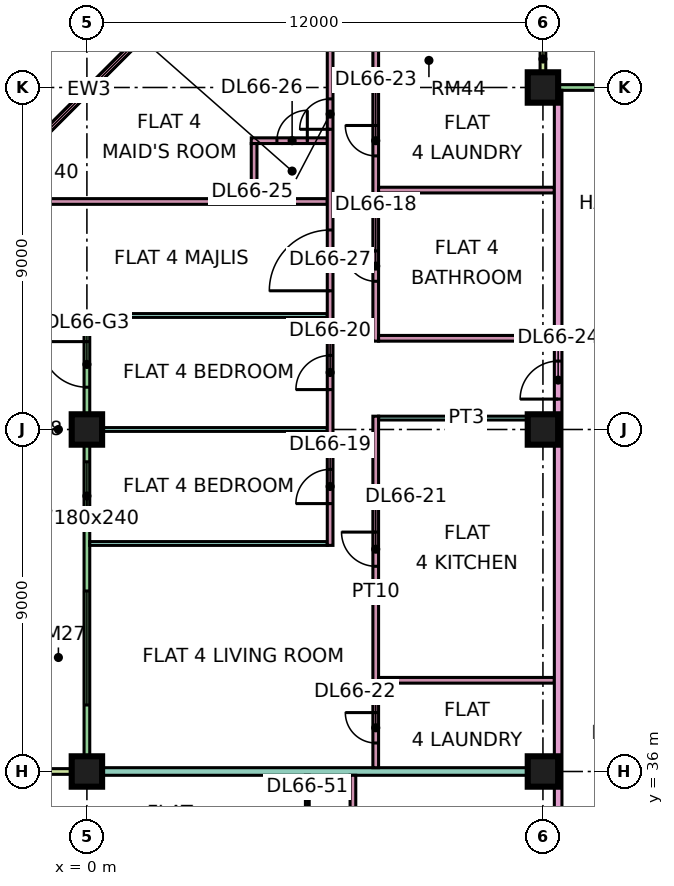
"""IFC4 building model, lengths in metres.
Left out: names, types, materials, properties, quantities, classifications, styles, units other than length and angle.
Written with IfcOpenShell. Run it as: python <this file> out.ifc"""

import sys

from ifc_helpers import new_model, si_unit, direction, frame, frame_2d, origin, origin_2d, place, context, subcontext, project, spatial, rectangle, extrude, element, fill, save


model = new_model("IFC4")
c1 = context("Model", 3, precision=1e-05, world=origin(), true_north=direction((0.0, 1.0)))
c2 = subcontext(c1, "Body", "Model", "MODEL_VIEW")
j1 = project(units=[si_unit("LENGTHUNIT", "METRE"), si_unit("PLANEANGLEUNIT", "RADIAN")], contexts=[c1])
p1 = place(None, origin())
s1 = spatial("IfcSite", under=j1, at=p1, CompositionType="ELEMENT")
p2 = place(p1, origin())
s2 = spatial("IfcBuilding", under=s1, at=p2, CompositionType="ELEMENT")
p3 = place(p2, frame((0.0, 0.0, 284.65)))
s3 = spatial("IfcBuildingStorey", under=s2, at=p3, CompositionType="ELEMENT", Elevation=284.65)
p4 = place(p3, frame((0.0, 36.0, 0.0), z_axis=(0.0, 0.0, 1.0), x_axis=(1.0, 0.0, 0.0)))
e1 = element("IfcColumn", 1, at=p4, inside=s3, PredefinedType="COLUMN", context=c2, shape_type="SweptSolid", body=[
    extrude(rectangle(XDim=0.8, YDim=0.8, at=origin_2d()), origin(), (0.0, 0.0, 1.0), 3.75),
])
for number, where, z_axis, x_axis in (
    (2, (0.0, 45.0, 0.0), (0.0, 0.0, 1.0), (1.0, 0.0, 0.0)),
    (3, (12.0, 36.0, 0.0), (0.0, 0.0, 1.0), (1.0, 0.0, 0.0)),
    (4, (12.0, 45.0, 0.0), (0.0, 0.0, 1.0), (1.0, 0.0, 0.0)),
    (5, (12.0, 54.0, 0.0), (0.0, 0.0, 1.0), (1.0, 0.0, 0.0)),
):
    element("IfcColumn", number, at=place(p3, frame(where, z_axis=z_axis, x_axis=x_axis)), inside=s3, PredefinedType="COLUMN", context=c2, shape_type="SweptSolid", body=[
        extrude(rectangle(XDim=0.8, YDim=0.8, at=origin_2d()), origin(), (0.0, 0.0, 1.0), 3.75),
    ])
p5 = place(p3, frame((22.425, 54.0, 0.0), z_axis=(0.0, 0.0, 1.0), x_axis=(-1.0, 0.0, 0.0)))
e6 = element("IfcWall", 6, at=p5, inside=s3, PredefinedType="SOLIDWALL", context=c2, shape_type="SweptSolid", body=[
    extrude(rectangle(XDim=10.35, YDim=0.15, at=frame_2d((5.175, 0.0))), origin(), (0.0, 0.0, 1.0), 3.35),
])
p6 = place(p5, frame((1.012, 0.0, 0.45)))
e7 = element("IfcOpeningElement", 7, at=p6, cuts=e6, PredefinedType="OPENING", context=c2, shape_type="SweptSolid", body=[
    extrude(rectangle(XDim=4.8, YDim=2.4, at=frame_2d((2.4, 1.2))), frame((0.0, 0.085, 0.0), z_axis=(0.0, -1.0, 0.0), x_axis=(1.0, 0.0, 0.0)), (0.0, 0.0, 1.0), 0.17),
])
p7 = place(p3, frame((12.0, 55.5, 0.0), z_axis=(0.0, 0.0, 1.0), x_axis=(0.0, -1.0, 0.0)))
e8 = element("IfcWall", 8, at=p7, inside=s3, PredefinedType="SOLIDWALL", context=c2, shape_type="SweptSolid", body=[
    extrude(rectangle(XDim=1.5, YDim=0.15, at=frame_2d((0.75, 0.0))), origin(), (0.0, 0.0, 1.0), 3.35),
])
p8 = place(p3, frame((1.553, 55.447, 0.0), z_axis=(0.0, 0.0, 1.0), x_axis=(-0.707106781187, -0.707106781187, 0.0)))
e9 = element("IfcWall", 9, at=p8, inside=s3, PredefinedType="SOLIDWALL", context=c2, shape_type="SweptSolid", body=[
    extrude(rectangle(XDim=4.243, YDim=0.15, at=frame_2d((2.121, 0.0))), origin(), (0.0, 0.0, 1.0), 3.35),
])
p9 = place(p8, frame((0.621, 0.0, 0.45)))
e10 = element("IfcOpeningElement", 10, at=p9, cuts=e9, PredefinedType="OPENING", context=c2, shape_type="SweptSolid", body=[
    extrude(rectangle(XDim=3.0, YDim=2.4, at=frame_2d((1.5, 1.2))), frame((0.0, 0.085, 0.0), z_axis=(0.0, -1.0, 0.0), x_axis=(1.0, 0.0, 0.0)), (0.0, 0.0, 1.0), 0.17),
])
p10 = place(p3, frame((0.0, 47.925, 0.0), z_axis=(0.0, 0.0, 1.0), x_axis=(0.0, -1.0, 0.0)))
e11 = element("IfcWall", 11, at=p10, inside=s3, PredefinedType="SOLIDWALL", context=c2, shape_type="SweptSolid", body=[
    extrude(rectangle(XDim=11.85, YDim=0.15, at=frame_2d((5.925, 0.0))), origin(), (0.0, 0.0, 1.0), 3.35),
])
p11 = place(p10, frame((0.613, 0.0, 0.0)))
e12 = element("IfcOpeningElement", 12, at=p11, cuts=e11, PredefinedType="OPENING", context=c2, shape_type="SweptSolid", body=[
    extrude(rectangle(XDim=1.2, YDim=2.4, at=frame_2d((0.6, 1.2))), frame((0.0, 0.085, 0.0), z_axis=(0.0, -1.0, 0.0), x_axis=(1.0, 0.0, 0.0)), (0.0, 0.0, 1.0), 0.17),
])
p12 = place(p10, frame((3.775, 0.0, 0.45)))
e13 = element("IfcOpeningElement", 13, at=p12, cuts=e11, PredefinedType="OPENING", context=c2, shape_type="SweptSolid", body=[
    extrude(rectangle(XDim=1.8, YDim=2.4, at=frame_2d((0.9, 1.2))), frame((0.0, 0.085, 0.0), z_axis=(0.0, -1.0, 0.0), x_axis=(1.0, 0.0, 0.0)), (0.0, 0.0, 1.0), 0.17),
])
p13 = place(p10, frame((7.175, 0.0, 0.45)))
e14 = element("IfcOpeningElement", 14, at=p13, cuts=e11, PredefinedType="OPENING", context=c2, shape_type="SweptSolid", body=[
    extrude(rectangle(XDim=3.0, YDim=2.4, at=frame_2d((1.5, 1.2))), frame((0.0, 0.085, 0.0), z_axis=(0.0, -1.0, 0.0), x_axis=(1.0, 0.0, 0.0)), (0.0, 0.0, 1.0), 0.17),
])
for number, where, z_axis, x_axis in (
    (15, (-1.5, 48.0, 0.0), (0.0, 0.0, 1.0), (1.0, 0.0, 0.0)),
    (16, (-1.5, 36.0, 0.0), (0.0, 0.0, 1.0), (1.0, 0.0, 0.0)),
):
    element("IfcWall", number, at=place(p3, frame(where, z_axis=z_axis, x_axis=x_axis)), inside=s3, PredefinedType="SOLIDWALL", context=c2, shape_type="SweptSolid", body=[
        extrude(rectangle(XDim=1.5, YDim=0.15, at=frame_2d((0.75, 0.0))), origin(), (0.0, 0.0, 1.0), 3.35),
    ])
p14 = place(p3, frame((-1.351, 51.0, 0.0), z_axis=(0.0, 0.0, 1.0), x_axis=(1.0, 0.0, 0.0)))
e17 = element("IfcWall", 17, at=p14, inside=s3, PredefinedType="PARTITIONING", context=c2, shape_type="SweptSolid", body=[
    extrude(rectangle(XDim=7.676, YDim=0.15, at=frame_2d((3.838, 0.0))), origin(), (0.0, 0.0, 1.0), 3.35),
])
e18 = element("IfcWall", 18, at=p4, inside=s3, PredefinedType="PARTITIONING", context=c2, shape_type="SweptSolid", body=[
    extrude(rectangle(XDim=12.3, YDim=0.2, at=frame_2d((6.15, 0.0))), origin(), (0.0, 0.0, 1.0), 3.35),
])
p15 = place(p3, frame((0.0, 48.0, 0.0), z_axis=(0.0, 0.0, 1.0), x_axis=(1.0, 0.0, 0.0)))
e19 = element("IfcWall", 19, at=p15, inside=s3, PredefinedType="PARTITIONING", context=c2, shape_type="SweptSolid", body=[
    extrude(rectangle(XDim=6.325, YDim=0.1, at=frame_2d((3.163, 0.0))), origin(), (0.0, 0.0, 1.0), 3.35),
])
for number, where, z_axis, x_axis in (
    (20, (0.074, 42.0, 0.0), (0.0, 0.0, 1.0), (1.0, 0.0, 0.0)),
    (21, (0.074, 45.0, 0.0), (0.0, 0.0, 1.0), (1.0, 0.0, 0.0)),
):
    element("IfcWall", number, at=place(p3, frame(where, z_axis=z_axis, x_axis=x_axis)), inside=s3, PredefinedType="PARTITIONING", context=c2, shape_type="SweptSolid", body=[
        extrude(rectangle(XDim=6.251, YDim=0.1, at=frame_2d((3.125, 0.0))), origin(), (0.0, 0.0, 1.0), 3.35),
    ])
p16 = place(p3, frame((4.325, 52.6, 0.0), z_axis=(0.0, 0.0, 1.0), x_axis=(1.0, 0.0, 0.0)))
e22 = element("IfcWall", 22, at=p16, inside=s3, PredefinedType="PARTITIONING", context=c2, shape_type="SweptSolid", body=[
    extrude(rectangle(XDim=2.0, YDim=0.15, at=frame_2d((1.0, 0.0))), origin(), (0.0, 0.0, 1.0), 3.35),
])
p17 = place(p16, frame((0.675, 0.0, 0.0)))
e23 = element("IfcOpeningElement", 23, at=p17, cuts=e22, PredefinedType="OPENING", context=c2, shape_type="SweptSolid", body=[
    extrude(rectangle(XDim=0.8, YDim=2.1, at=frame_2d((0.4, 1.05))), frame((0.0, 0.085, 0.0), z_axis=(0.0, -1.0, 0.0), x_axis=(1.0, 0.0, 0.0)), (0.0, 0.0, 1.0), 0.17),
])
p18 = place(p3, frame((4.4, 51.075, 0.0), z_axis=(0.0, 0.0, 1.0), x_axis=(0.0, 1.0, 0.0)))
e24 = element("IfcWall", 24, at=p18, inside=s3, PredefinedType="PARTITIONING", context=c2, shape_type="SweptSolid", body=[
    extrude(rectangle(XDim=1.45, YDim=0.15, at=frame_2d((0.725, 0.0))), origin(), (0.0, 0.0, 1.0), 3.35),
])
p19 = place(p3, frame((5.8, 29.95, 0.0), z_axis=(0.0, 0.0, 1.0), x_axis=(0.0, 1.0, 0.0)))
e25 = element("IfcWall", 25, at=p19, inside=s3, PredefinedType="PARTITIONING", context=c2, shape_type="SweptSolid", body=[
    extrude(rectangle(XDim=5.95, YDim=0.1, at=frame_2d((2.975, 0.0))), origin(), (0.0, 0.0, 1.0), 3.35),
])
p20 = place(p19, frame((1.1, 0.0, 0.0)))
e26 = element("IfcOpeningElement", 26, at=p20, cuts=e25, PredefinedType="OPENING", context=c2, shape_type="SweptSolid", body=[
    extrude(rectangle(XDim=0.9, YDim=2.1, at=frame_2d((0.45, 1.05))), frame((0.0, 0.06, 0.0), z_axis=(0.0, -1.0, 0.0), x_axis=(1.0, 0.0, 0.0)), (0.0, 0.0, 1.0), 0.12),
])
p21 = place(p19, frame((4.1, 0.0, 0.0)))
e27 = element("IfcOpeningElement", 27, at=p21, cuts=e25, PredefinedType="OPENING", context=c2, shape_type="SweptSolid", body=[
    extrude(rectangle(XDim=0.9, YDim=2.1, at=frame_2d((0.45, 1.05))), frame((0.0, 0.06, 0.0), z_axis=(0.0, -1.0, 0.0), x_axis=(1.0, 0.0, 0.0)), (0.0, 0.0, 1.0), 0.12),
])
p22 = place(p3, frame((6.4, 41.95, 0.0), z_axis=(0.0, 0.0, 1.0), x_axis=(0.0, 1.0, 0.0)))
e28 = element("IfcWall", 28, at=p22, inside=s3, PredefinedType="PARTITIONING", context=c2, shape_type="SweptSolid", body=[
    extrude(rectangle(XDim=13.4, YDim=0.15, at=frame_2d((6.7, 0.0))), origin(), (0.0, 0.0, 1.0), 3.35),
])
p23 = place(p22, frame((1.1, 0.0, 0.0)))
e29 = element("IfcOpeningElement", 29, at=p23, cuts=e28, PredefinedType="OPENING", context=c2, shape_type="SweptSolid", body=[
    extrude(rectangle(XDim=0.9, YDim=2.1, at=frame_2d((0.45, 1.05))), frame((0.0, 0.085, 0.0), z_axis=(0.0, -1.0, 0.0), x_axis=(1.0, 0.0, 0.0)), (0.0, 0.0, 1.0), 0.17),
])
p24 = place(p22, frame((4.1, 0.0, 0.0)))
e30 = element("IfcOpeningElement", 30, at=p24, cuts=e28, PredefinedType="OPENING", context=c2, shape_type="SweptSolid", body=[
    extrude(rectangle(XDim=0.9, YDim=2.1, at=frame_2d((0.45, 1.05))), frame((0.0, 0.085, 0.0), z_axis=(0.0, -1.0, 0.0), x_axis=(1.0, 0.0, 0.0)), (0.0, 0.0, 1.0), 0.17),
])
p25 = place(p22, frame((10.95, 0.0, 0.0)))
e31 = element("IfcOpeningElement", 31, at=p25, cuts=e28, PredefinedType="OPENING", context=c2, shape_type="SweptSolid", body=[
    extrude(rectangle(XDim=0.8, YDim=2.1, at=frame_2d((0.4, 1.05))), frame((0.0, 0.085, 0.0), z_axis=(0.0, -1.0, 0.0), x_axis=(1.0, 0.0, 0.0)), (0.0, 0.0, 1.0), 0.17),
])
p26 = place(p22, frame((6.7, 0.0, 0.0)))
e32 = element("IfcOpeningElement", 32, at=p26, cuts=e28, PredefinedType="OPENING", context=c2, shape_type="SweptSolid", body=[
    extrude(rectangle(XDim=1.6, YDim=2.1, at=frame_2d((0.8, 1.05))), frame((0.0, 0.085, 0.0), z_axis=(0.0, -1.0, 0.0), x_axis=(1.0, 0.0, 0.0)), (0.0, 0.0, 1.0), 0.17),
])
p27 = place(p3, frame((7.0, 27.525, 0.0), z_axis=(0.0, 0.0, 1.0), x_axis=(0.0, 1.0, 0.0)))
e33 = element("IfcWall", 33, at=p27, inside=s3, PredefinedType="PARTITIONING", context=c2, shape_type="SweptSolid", body=[
    extrude(rectangle(XDim=8.375, YDim=0.15, at=frame_2d((4.188, 0.0))), origin(), (0.0, 0.0, 1.0), 3.35),
])
p28 = place(p27, frame((0.525, 0.0, 0.0)))
e34 = element("IfcOpeningElement", 34, at=p28, cuts=e33, PredefinedType="OPENING", context=c2, shape_type="SweptSolid", body=[
    extrude(rectangle(XDim=0.8, YDim=2.1, at=frame_2d((0.4, 1.05))), frame((0.0, 0.085, 0.0), z_axis=(0.0, -1.0, 0.0), x_axis=(1.0, 0.0, 0.0)), (0.0, 0.0, 1.0), 0.17),
])
p29 = place(p27, frame((4.725, 0.0, 0.0)))
e35 = element("IfcOpeningElement", 35, at=p29, cuts=e33, PredefinedType="OPENING", context=c2, shape_type="SweptSolid", body=[
    extrude(rectangle(XDim=0.9, YDim=2.1, at=frame_2d((0.45, 1.05))), frame((0.0, 0.085, 0.0), z_axis=(0.0, -1.0, 0.0), x_axis=(1.0, 0.0, 0.0)), (0.0, 0.0, 1.0), 0.17),
])
p30 = place(p3, frame((7.6, 36.1, 0.0), z_axis=(0.0, 0.0, 1.0), x_axis=(0.0, 1.0, 0.0)))
e36 = element("IfcWall", 36, at=p30, inside=s3, PredefinedType="PARTITIONING", context=c2, shape_type="SweptSolid", body=[
    extrude(rectangle(XDim=9.25, YDim=0.15, at=frame_2d((4.625, 0.0))), origin(), (0.0, 0.0, 1.0), 3.35),
])
p31 = place(p30, frame((5.3, 0.0, 0.0)))
e37 = element("IfcOpeningElement", 37, at=p31, cuts=e36, PredefinedType="OPENING", context=c2, shape_type="SweptSolid", body=[
    extrude(rectangle(XDim=0.9, YDim=2.1, at=frame_2d((0.45, 1.05))), frame((0.0, 0.085, 0.0), z_axis=(0.0, -1.0, 0.0), x_axis=(1.0, 0.0, 0.0)), (0.0, 0.0, 1.0), 0.17),
])
p32 = place(p30, frame((0.65, 0.0, 0.0)))
e38 = element("IfcOpeningElement", 38, at=p32, cuts=e36, PredefinedType="OPENING", context=c2, shape_type="SweptSolid", body=[
    extrude(rectangle(XDim=0.8, YDim=2.1, at=frame_2d((0.4, 1.05))), frame((0.0, 0.085, 0.0), z_axis=(0.0, -1.0, 0.0), x_axis=(1.0, 0.0, 0.0)), (0.0, 0.0, 1.0), 0.17),
])
p33 = place(p3, frame((7.6, 47.325, 0.0), z_axis=(0.0, 0.0, 1.0), x_axis=(0.0, 1.0, 0.0)))
e39 = element("IfcWall", 39, at=p33, inside=s3, PredefinedType="PARTITIONING", context=c2, shape_type="SweptSolid", body=[
    extrude(rectangle(XDim=8.025, YDim=0.15, at=frame_2d((4.013, 0.0))), origin(), (0.0, 0.0, 1.0), 3.35),
])
p34 = place(p33, frame((1.575, 0.0, 0.0)))
e40 = element("IfcOpeningElement", 40, at=p34, cuts=e39, PredefinedType="OPENING", context=c2, shape_type="SweptSolid", body=[
    extrude(rectangle(XDim=0.8, YDim=2.1, at=frame_2d((0.4, 1.05))), frame((0.0, 0.085, 0.0), z_axis=(0.0, -1.0, 0.0), x_axis=(1.0, 0.0, 0.0)), (0.0, 0.0, 1.0), 0.17),
])
p35 = place(p33, frame((4.875, 0.0, 0.0)))
e41 = element("IfcOpeningElement", 41, at=p35, cuts=e39, PredefinedType="OPENING", context=c2, shape_type="SweptSolid", body=[
    extrude(rectangle(XDim=0.8, YDim=2.1, at=frame_2d((0.4, 1.05))), frame((0.0, 0.085, 0.0), z_axis=(0.0, -1.0, 0.0), x_axis=(1.0, 0.0, 0.0)), (0.0, 0.0, 1.0), 0.17),
])
p36 = place(p3, frame((7.675, 38.4, 0.0), z_axis=(0.0, 0.0, 1.0), x_axis=(1.0, 0.0, 0.0)))
e42 = element("IfcWall", 42, at=p36, inside=s3, PredefinedType="PARTITIONING", context=c2, shape_type="SweptSolid", body=[
    extrude(rectangle(XDim=4.625, YDim=0.15, at=frame_2d((2.312, 0.0))), origin(), (0.0, 0.0, 1.0), 3.35),
])
p37 = place(p3, frame((7.675, 45.3, 0.0), z_axis=(0.0, 0.0, 1.0), x_axis=(1.0, 0.0, 0.0)))
e43 = element("IfcWall", 43, at=p37, inside=s3, PredefinedType="PARTITIONING", context=c2, shape_type="SweptSolid", body=[
    extrude(rectangle(XDim=4.625, YDim=0.1, at=frame_2d((2.312, 0.0))), origin(), (0.0, 0.0, 1.0), 3.35),
])
for number, where, z_axis, x_axis in (
    (44, (7.675, 47.4, 0.0), (0.0, 0.0, 1.0), (1.0, 0.0, 0.0)),
    (45, (7.675, 51.3, 0.0), (0.0, 0.0, 1.0), (1.0, 0.0, 0.0)),
):
    element("IfcWall", number, at=place(p3, frame(where, z_axis=z_axis, x_axis=x_axis)), inside=s3, PredefinedType="PARTITIONING", context=c2, shape_type="SweptSolid", body=[
        extrude(rectangle(XDim=4.625, YDim=0.15, at=frame_2d((2.312, 0.0))), origin(), (0.0, 0.0, 1.0), 3.35),
    ])
p38 = place(p3, frame((12.4, 20.0, 0.0), z_axis=(0.0, 0.0, 1.0), x_axis=(0.0, 1.0, 0.0)))
e46 = element("IfcWall", 46, at=p38, inside=s3, PredefinedType="PARTITIONING", context=c2, shape_type="SweptSolid", body=[
    extrude(rectangle(XDim=33.926, YDim=0.2, at=frame_2d((16.963, 0.0))), origin(), (0.0, 0.0, 1.0), 3.35),
])
p39 = place(p38, frame((25.8, 0.0, 0.0)))
e47 = element("IfcOpeningElement", 47, at=p39, cuts=e46, PredefinedType="OPENING", context=c2, shape_type="SweptSolid", body=[
    extrude(rectangle(XDim=1.0, YDim=2.1, at=frame_2d((0.5, 1.05))), frame((0.0, 0.11, 0.0), z_axis=(0.0, -1.0, 0.0), x_axis=(1.0, 0.0, 0.0)), (0.0, 0.0, 1.0), 0.22),
])
p40 = place(p38, frame((0.6, 0.0, 0.0)))
e48 = element("IfcOpeningElement", 48, at=p40, cuts=e46, PredefinedType="OPENING", context=c2, shape_type="SweptSolid", body=[
    extrude(rectangle(XDim=1.2, YDim=2.1, at=frame_2d((0.6, 1.05))), frame((0.0, 0.11, 0.0), z_axis=(0.0, -1.0, 0.0), x_axis=(1.0, 0.0, 0.0)), (0.0, 0.0, 1.0), 0.22),
])
p41 = place(p38, frame((4.5, 0.0, 0.0)))
e49 = element("IfcOpeningElement", 49, at=p41, cuts=e46, PredefinedType="OPENING", context=c2, shape_type="SweptSolid", body=[
    extrude(rectangle(XDim=1.0, YDim=2.1, at=frame_2d((0.5, 1.05))), frame((0.0, 0.11, 0.0), z_axis=(0.0, -1.0, 0.0), x_axis=(1.0, 0.0, 0.0)), (0.0, 0.0, 1.0), 0.22),
])
p42 = place(p9, origin())
e50 = element("IfcWindow", 50, at=p42, inside=s3, PartitioningType="SINGLE_PANEL", PredefinedType="WINDOW", context=c2, shape_type="SweptSolid", body=[
    extrude(rectangle(XDim=3.0, YDim=2.4, at=frame_2d((1.5, 1.2))), frame((0.0, 0.03, 0.0), z_axis=(0.0, -1.0, 0.0), x_axis=(1.0, 0.0, 0.0)), (0.0, 0.0, 1.0), 0.06),
])
fill(e10, e50)
p43 = place(p11, frame((1.2, 0.0, 0.0), z_axis=(0.0, 0.0, 1.0), x_axis=(-1.0, 0.0, 0.0)))
e51 = element("IfcDoor", 51, at=p43, inside=s3, OperationType="DOUBLE_DOOR_SINGLE_SWING", PredefinedType="DOOR", context=c2, shape_type="SweptSolid", body=[
    extrude(rectangle(XDim=1.2, YDim=2.4, at=frame_2d((0.6, 1.2))), frame((0.0, 0.025, 0.0), z_axis=(0.0, -1.0, 0.0), x_axis=(1.0, 0.0, 0.0)), (0.0, 0.0, 1.0), 0.05),
])
fill(e12, e51)
p44 = place(p12, origin())
e52 = element("IfcWindow", 52, at=p44, inside=s3, PartitioningType="SINGLE_PANEL", PredefinedType="WINDOW", context=c2, shape_type="SweptSolid", body=[
    extrude(rectangle(XDim=1.8, YDim=2.4, at=frame_2d((0.9, 1.2))), frame((0.0, 0.03, 0.0), z_axis=(0.0, -1.0, 0.0), x_axis=(1.0, 0.0, 0.0)), (0.0, 0.0, 1.0), 0.06),
])
fill(e13, e52)
p45 = place(p13, origin())
e53 = element("IfcWindow", 53, at=p45, inside=s3, PartitioningType="SINGLE_PANEL", PredefinedType="WINDOW", context=c2, shape_type="SweptSolid", body=[
    extrude(rectangle(XDim=3.0, YDim=2.4, at=frame_2d((1.5, 1.2))), frame((0.0, 0.03, 0.0), z_axis=(0.0, -1.0, 0.0), x_axis=(1.0, 0.0, 0.0)), (0.0, 0.0, 1.0), 0.06),
])
fill(e14, e53)
p46 = place(p34, frame((0.8, 0.0, 0.0), z_axis=(0.0, 0.0, 1.0), x_axis=(-1.0, 0.0, 0.0)))
e54 = element("IfcDoor", 54, at=p46, inside=s3, OperationType="SINGLE_SWING_RIGHT", PredefinedType="DOOR", context=c2, shape_type="SweptSolid", body=[
    extrude(rectangle(XDim=0.8, YDim=2.1, at=frame_2d((0.4, 1.05))), frame((0.0, 0.025, 0.0), z_axis=(0.0, -1.0, 0.0), x_axis=(1.0, 0.0, 0.0)), (0.0, 0.0, 1.0), 0.05),
])
fill(e40, e54)
p47 = place(p23, origin())
e55 = element("IfcDoor", 55, at=p47, inside=s3, OperationType="SINGLE_SWING_LEFT", PredefinedType="DOOR", context=c2, shape_type="SweptSolid", body=[
    extrude(rectangle(XDim=0.9, YDim=2.1, at=frame_2d((0.45, 1.05))), frame((0.0, 0.025, 0.0), z_axis=(0.0, -1.0, 0.0), x_axis=(1.0, 0.0, 0.0)), (0.0, 0.0, 1.0), 0.05),
])
fill(e29, e55)
p48 = place(p24, origin())
e56 = element("IfcDoor", 56, at=p48, inside=s3, OperationType="SINGLE_SWING_LEFT", PredefinedType="DOOR", context=c2, shape_type="SweptSolid", body=[
    extrude(rectangle(XDim=0.9, YDim=2.1, at=frame_2d((0.45, 1.05))), frame((0.0, 0.025, 0.0), z_axis=(0.0, -1.0, 0.0), x_axis=(1.0, 0.0, 0.0)), (0.0, 0.0, 1.0), 0.05),
])
fill(e30, e56)
p49 = place(p31, frame((0.9, 0.0, 0.0), z_axis=(0.0, 0.0, 1.0), x_axis=(-1.0, 0.0, 0.0)))
e57 = element("IfcDoor", 57, at=p49, inside=s3, OperationType="SINGLE_SWING_RIGHT", PredefinedType="DOOR", context=c2, shape_type="SweptSolid", body=[
    extrude(rectangle(XDim=0.9, YDim=2.1, at=frame_2d((0.45, 1.05))), frame((0.0, 0.025, 0.0), z_axis=(0.0, -1.0, 0.0), x_axis=(1.0, 0.0, 0.0)), (0.0, 0.0, 1.0), 0.05),
])
fill(e37, e57)
p50 = place(p32, frame((0.8, 0.0, 0.0), z_axis=(0.0, 0.0, 1.0), x_axis=(-1.0, 0.0, 0.0)))
e58 = element("IfcDoor", 58, at=p50, inside=s3, OperationType="SINGLE_SWING_RIGHT", PredefinedType="DOOR", context=c2, shape_type="SweptSolid", body=[
    extrude(rectangle(XDim=0.8, YDim=2.1, at=frame_2d((0.4, 1.05))), frame((0.0, 0.025, 0.0), z_axis=(0.0, -1.0, 0.0), x_axis=(1.0, 0.0, 0.0)), (0.0, 0.0, 1.0), 0.05),
])
fill(e38, e58)
p51 = place(p35, frame((0.8, 0.0, 0.0), z_axis=(0.0, 0.0, 1.0), x_axis=(-1.0, 0.0, 0.0)))
e59 = element("IfcDoor", 59, at=p51, inside=s3, OperationType="SINGLE_SWING_RIGHT", PredefinedType="DOOR", context=c2, shape_type="SweptSolid", body=[
    extrude(rectangle(XDim=0.8, YDim=2.1, at=frame_2d((0.4, 1.05))), frame((0.0, 0.025, 0.0), z_axis=(0.0, -1.0, 0.0), x_axis=(1.0, 0.0, 0.0)), (0.0, 0.0, 1.0), 0.05),
])
fill(e41, e59)
p52 = place(p39, origin())
e60 = element("IfcDoor", 60, at=p52, inside=s3, OperationType="SINGLE_SWING_LEFT", PredefinedType="DOOR", context=c2, shape_type="SweptSolid", body=[
    extrude(rectangle(XDim=1.0, YDim=2.1, at=frame_2d((0.5, 1.05))), frame((0.0, 0.025, 0.0), z_axis=(0.0, -1.0, 0.0), x_axis=(1.0, 0.0, 0.0)), (0.0, 0.0, 1.0), 0.05),
])
fill(e47, e60)
p53 = place(p25, origin())
e61 = element("IfcDoor", 61, at=p53, inside=s3, OperationType="SINGLE_SWING_LEFT", PredefinedType="DOOR", context=c2, shape_type="SweptSolid", body=[
    extrude(rectangle(XDim=0.8, YDim=2.1, at=frame_2d((0.4, 1.05))), frame((0.0, 0.025, 0.0), z_axis=(0.0, -1.0, 0.0), x_axis=(1.0, 0.0, 0.0)), (0.0, 0.0, 1.0), 0.05),
])
fill(e31, e61)
p54 = place(p17, frame((0.8, 0.0, 0.0), z_axis=(0.0, 0.0, 1.0), x_axis=(-1.0, 0.0, 0.0)))
e62 = element("IfcDoor", 62, at=p54, inside=s3, OperationType="SINGLE_SWING_RIGHT", PredefinedType="DOOR", context=c2, shape_type="SweptSolid", body=[
    extrude(rectangle(XDim=0.8, YDim=2.1, at=frame_2d((0.4, 1.05))), frame((0.0, 0.025, 0.0), z_axis=(0.0, -1.0, 0.0), x_axis=(1.0, 0.0, 0.0)), (0.0, 0.0, 1.0), 0.05),
])
fill(e23, e62)
p55 = place(p26, origin())
e63 = element("IfcDoor", 63, at=p55, inside=s3, OperationType="DOUBLE_DOOR_SINGLE_SWING", PredefinedType="DOOR", context=c2, shape_type="SweptSolid", body=[
    extrude(rectangle(XDim=1.6, YDim=2.1, at=frame_2d((0.8, 1.05))), frame((0.0, 0.025, 0.0), z_axis=(0.0, -1.0, 0.0), x_axis=(1.0, 0.0, 0.0)), (0.0, 0.0, 1.0), 0.05),
])
fill(e32, e63)
save(model, sys.argv[1])
